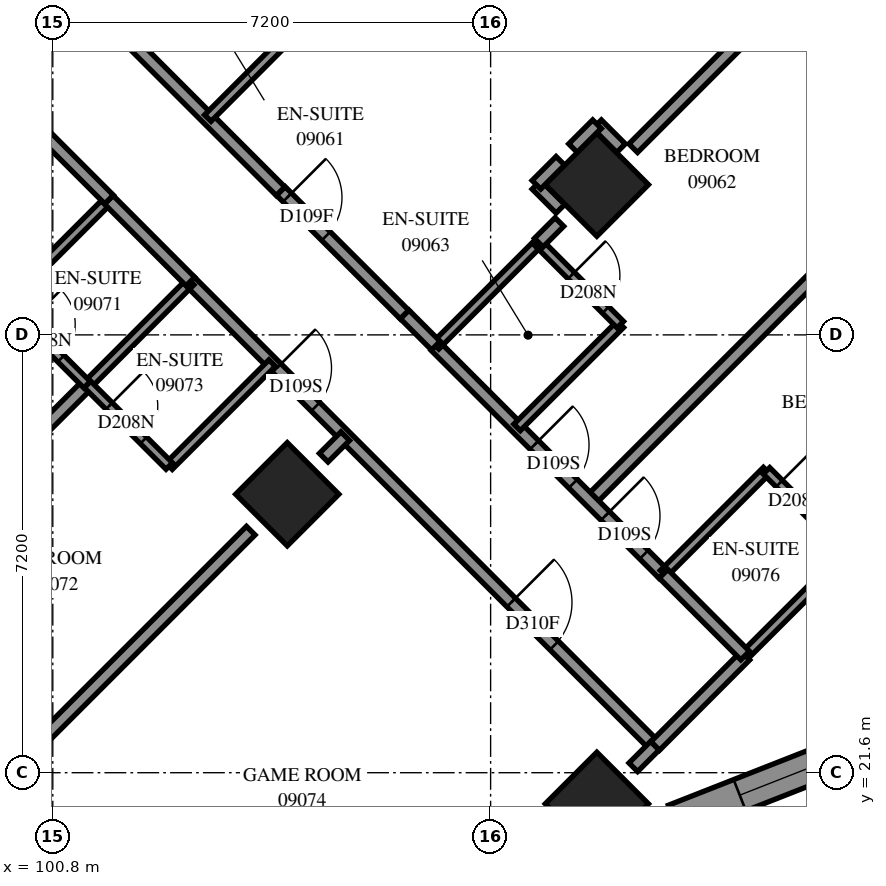
"""IFC4 building model, lengths in metres.
Left out: names, types, materials, properties, quantities, classifications, styles, units other than length and angle.
Written with IfcOpenShell. Run it as: python <this file> out.ifc"""

import sys

from ifc_helpers import new_model, si_unit, direction, frame, frame_2d, origin, origin_2d, place, context, subcontext, project, spatial, polyline, rectangle, outline, extrude, element, fill, save


model = new_model("IFC4")
c1 = context("Model", 3, precision=1e-05, world=origin(), true_north=direction((0.0, 1.0)))
c2 = subcontext(c1, "Body", "Model", "MODEL_VIEW")
j1 = project(units=[si_unit("LENGTHUNIT", "METRE"), si_unit("PLANEANGLEUNIT", "RADIAN")], contexts=[c1])
p1 = place(None, origin())
s1 = spatial("IfcSite", under=j1, at=p1, CompositionType="ELEMENT")
p2 = place(p1, origin())
s2 = spatial("IfcBuilding", under=s1, at=p2, CompositionType="ELEMENT")
p3 = place(p2, frame((0.0, 0.0, 37.2)))
s3 = spatial("IfcBuildingStorey", under=s2, at=p3, CompositionType="ELEMENT", Elevation=37.2)
for number, where, z_axis, x_axis in (
    (1, (109.747, 31.271, 0.0), (0.0, 0.0, 1.0), (0.707, -0.707, 0.0)),
    (2, (104.656, 26.18, 0.0), (0.0, 0.0, 1.0), (0.707, -0.707, 0.0)),
    (3, (109.747, 21.088, 0.0), (0.0, 0.0, 1.0), (0.707, -0.707, 0.0)),
):
    element("IfcColumn", number, at=place(p3, frame(where, z_axis=z_axis, x_axis=x_axis)), inside=s3, PredefinedType="COLUMN", context=c2, shape_type="SweptSolid", body=[
        extrude(rectangle(XDim=1.2, YDim=1.2, at=origin_2d()), origin(), (0.0, 0.0, 1.0), 3.1),
    ])
p4 = place(p3, frame((111.023, 20.809, 0.0), z_axis=(0.0, 0.0, 1.0), x_axis=(0.9307322689, 0.3657013038, 0.0)))
e4 = element("IfcWall", 4, at=p4, inside=s3, PredefinedType="SOLIDWALL", context=c2, shape_type="SweptSolid", body=[
    extrude(outline(polyline([(0.12, -0.275), (5.626, -0.275), (5.376, 0.275), (-0.12, 0.275), (0.12, -0.275)])), origin(), (0.0, 0.0, 1.0), 3.1),
])
p5 = place(p4, frame((1.154, 0.0, 0.5)))
e5 = element("IfcOpeningElement", 5, at=p5, cuts=e4, PredefinedType="OPENING", context=c2, shape_type="SweptSolid", body=[
    extrude(rectangle(XDim=2.8, YDim=2.45, at=frame_2d((1.4, 1.225))), frame((0.0, 0.285, 0.0), z_axis=(0.0, -1.0, 0.0), x_axis=(1.0, 0.0, 0.0)), (0.0, 0.0, 1.0), 0.57),
])
p6 = place(p3, frame((103.061, 29.677, 0.0), z_axis=(0.0, 0.0, 1.0), x_axis=(0.7071067812, -0.7071067812, 0.0)))
e6 = element("IfcWall", 6, at=p6, inside=s3, PredefinedType="PARTITIONING", context=c2, shape_type="SweptSolid", body=[
    extrude(rectangle(XDim=10.802, YDim=0.2, at=frame_2d((5.401, 0.0))), origin(), (0.0, 0.0, 1.0), 3.1),
])
p7 = place(p6, frame((2.012, 0.0, 0.0)))
e7 = element("IfcOpeningElement", 7, at=p7, cuts=e6, PredefinedType="OPENING", context=c2, shape_type="SweptSolid", body=[
    extrude(rectangle(XDim=0.9, YDim=2.1, at=frame_2d((0.45, 1.05))), frame((0.0, 0.11, 0.0), z_axis=(0.0, -1.0, 0.0), x_axis=(1.0, 0.0, 0.0)), (0.0, 0.0, 1.0), 0.22),
])
p8 = place(p6, frame((7.463, 0.0, 0.0)))
e8 = element("IfcOpeningElement", 8, at=p8, cuts=e6, PredefinedType="OPENING", context=c2, shape_type="SweptSolid", body=[
    extrude(rectangle(XDim=1.0, YDim=2.1, at=frame_2d((0.5, 1.05))), frame((0.0, 0.11, 0.0), z_axis=(0.0, -1.0, 0.0), x_axis=(1.0, 0.0, 0.0)), (0.0, 0.0, 1.0), 0.22),
])
p9 = place(p3, frame((99.455, 36.253, 0.0), z_axis=(0.0, 0.0, 1.0), x_axis=(0.7071067812, -0.7071067812, 0.0)))
e9 = element("IfcWall", 9, at=p9, inside=s3, PredefinedType="PARTITIONING", context=c2, shape_type="SweptSolid", body=[
    extrude(rectangle(XDim=7.201, YDim=0.2, at=frame_2d((3.601, 0.0))), origin(), (0.0, 0.0, 1.0), 3.1),
])
p10 = place(p9, frame((0.401, 0.0, 0.0)))
e10 = element("IfcOpeningElement", 10, at=p10, cuts=e9, PredefinedType="OPENING", context=c2, shape_type="SweptSolid", body=[
    extrude(rectangle(XDim=0.9, YDim=2.1, at=frame_2d((0.45, 1.05))), frame((0.0, 0.11, 0.0), z_axis=(0.0, -1.0, 0.0), x_axis=(1.0, 0.0, 0.0)), (0.0, 0.0, 1.0), 0.22),
])
p11 = place(p3, frame((96.534, 23.151, 0.0), z_axis=(0.0, 0.0, 1.0), x_axis=(0.7071067812, 0.7071067812, 0.0)))
e11 = element("IfcWall", 11, at=p11, inside=s3, PredefinedType="PARTITIONING", context=c2, shape_type="SweptSolid", body=[
    extrude(rectangle(XDim=6.835, YDim=0.2, at=frame_2d((3.417, 0.0))), origin(), (0.0, 0.0, 1.0), 3.1),
])
p12 = place(p3, frame((109.64, 26.074, 0.0), z_axis=(0.0, 0.0, 1.0), x_axis=(0.7072538194, 0.7069597124, 0.0)))
e12 = element("IfcWall", 12, at=p12, inside=s3, PredefinedType="PARTITIONING", context=c2, shape_type="SweptSolid", body=[
    extrude(rectangle(XDim=6.8, YDim=0.2, at=frame_2d((3.4, 0.0))), origin(), (0.0, 0.0, 1.0), 3.1),
])
for number, where, z_axis, x_axis in (
    (13, (110.345, 31.871, 0.0), (0.0, 0.0, 1.0), (0.707, 0.707, 0.0)),
    (14, (100.163, 21.689, 0.0), (0.0, 0.0, 1.0), (0.707, 0.707, 0.0)),
):
    element("IfcWall", number, at=place(p3, frame(where, z_axis=z_axis, x_axis=x_axis)), inside=s3, PredefinedType="PARTITIONING", context=c2, shape_type="SweptSolid", body=[
        extrude(rectangle(XDim=5.504, YDim=0.2, at=frame_2d((2.752, 0.0))), origin(), (0.0, 0.0, 1.0), 3.1),
    ])
p13 = place(p3, frame((107.093, 28.615, 0.0), z_axis=(0.0, 0.0, 1.0), x_axis=(0.7072011313, -0.7070124185, 0.0)))
e15 = element("IfcWall", 15, at=p13, inside=s3, PredefinedType="PARTITIONING", context=c2, shape_type="SweptSolid", body=[
    extrude(rectangle(XDim=5.299, YDim=0.2, at=frame_2d((2.65, 0.0))), origin(), (0.0, 0.0, 1.0), 3.1),
])
p14 = place(p13, frame((2.299, 0.0, 0.0)))
e16 = element("IfcOpeningElement", 16, at=p14, cuts=e15, PredefinedType="OPENING", context=c2, shape_type="SweptSolid", body=[
    extrude(rectangle(XDim=0.9, YDim=2.1, at=frame_2d((0.45, 1.05))), frame((0.0, 0.11, 0.0), z_axis=(0.0, -1.0, 0.0), x_axis=(1.0, 0.0, 0.0)), (0.0, 0.0, 1.0), 0.22),
])
p15 = place(p13, frame((3.949, 0.0, 0.0)))
e17 = element("IfcOpeningElement", 17, at=p15, cuts=e15, PredefinedType="OPENING", context=c2, shape_type="SweptSolid", body=[
    extrude(rectangle(XDim=0.9, YDim=2.1, at=frame_2d((0.45, 1.05))), frame((0.0, 0.11, 0.0), z_axis=(0.0, -1.0, 0.0), x_axis=(1.0, 0.0, 0.0)), (0.0, 0.0, 1.0), 0.22),
])
p16 = place(p3, frame((104.551, 31.165, 0.0), z_axis=(0.0, 0.0, 1.0), x_axis=(0.7074545101, -0.7067588812, 0.0)))
e18 = element("IfcWall", 18, at=p16, inside=s3, PredefinedType="PARTITIONING", context=c2, shape_type="SweptSolid", body=[
    extrude(rectangle(XDim=2.875, YDim=0.2, at=frame_2d((1.438, 0.0))), origin(), (0.0, 0.0, 1.0), 3.1),
])
p17 = place(p16, frame((0.148, 0.0, 0.0)))
e19 = element("IfcOpeningElement", 19, at=p17, cuts=e18, PredefinedType="OPENING", context=c2, shape_type="SweptSolid", body=[
    extrude(rectangle(XDim=0.9, YDim=2.1, at=frame_2d((0.45, 1.05))), frame((0.0, 0.11, 0.0), z_axis=(0.0, -1.0, 0.0), x_axis=(1.0, 0.0, 0.0)), (0.0, 0.0, 1.0), 0.22),
])
p18 = place(p3, frame((100.023, 29.327, 0.0), z_axis=(0.0, 0.0, 1.0), x_axis=(0.7071067812, 0.7071067812, 0.0)))
e20 = element("IfcWall", 20, at=p18, inside=s3, PredefinedType="PARTITIONING", context=c2, shape_type="SweptSolid", body=[
    extrude(rectangle(XDim=2.401, YDim=0.15, at=frame_2d((1.201, 0.0))), origin(), (0.0, 0.0, 1.0), 3.1),
])
for number, where, z_axis, x_axis in (
    (21, (101.371, 27.979, 0.0), (0.0, 0.0, 1.0), (0.707, 0.708, 0.0)),
    (22, (108.435, 27.279, 0.0), (0.0, 0.0, 1.0), (0.708, 0.707, 0.0)),
    (23, (103.349, 32.365, 0.0), (0.0, 0.0, 1.0), (0.707, 0.708, 0.0)),
):
    element("IfcWall", number, at=place(p3, frame(where, z_axis=z_axis, x_axis=x_axis)), inside=s3, PredefinedType="PARTITIONING", context=c2, shape_type="SweptSolid", body=[
        extrude(rectangle(XDim=2.4, YDim=0.15, at=frame_2d((1.2, 0.0))), origin(), (0.0, 0.0, 1.0), 3.1),
    ])
p19 = place(p3, frame((112.183, 23.531, 0.0), z_axis=(0.0, 0.0, 1.0), x_axis=(0.7075233388, 0.706689978, 0.0)))
e24 = element("IfcWall", 24, at=p19, inside=s3, PredefinedType="PARTITIONING", context=c2, shape_type="SweptSolid", body=[
    extrude(rectangle(XDim=2.4, YDim=0.15, at=frame_2d((1.2, 0.0))), origin(), (0.0, 0.0, 1.0), 2.6),
])
for number, where, z_axis, x_axis in (
    (25, (102.711, 26.641, 0.0), (0.0, 0.0, 1.0), (0.707, 0.707, 0.0)),
    (26, (107.095, 28.621, 0.0), (0.0, 0.0, 1.0), (0.707, 0.707, 0.0)),
    (27, (110.843, 24.873, 0.0), (0.0, 0.0, 1.0), (0.707, 0.707, 0.0)),
):
    element("IfcWall", number, at=place(p3, frame(where, z_axis=z_axis, x_axis=x_axis)), inside=s3, PredefinedType="PARTITIONING", context=c2, shape_type="SweptSolid", body=[
        extrude(rectangle(XDim=2.398, YDim=0.15, at=frame_2d((1.199, 0.0))), origin(), (0.0, 0.0, 1.0), 3.1),
    ])
p20 = place(p3, frame((110.705, 22.039, 0.0), z_axis=(0.0, 0.0, 1.0), x_axis=(0.7066304548, 0.7075827869, 0.0)))
e28 = element("IfcWall", 28, at=p20, inside=s3, PredefinedType="PARTITIONING", context=c2, shape_type="SweptSolid", body=[
    extrude(rectangle(XDim=2.1, YDim=0.2, at=frame_2d((1.05, 0.0))), origin(), (0.0, 0.0, 1.0), 2.6),
])
p21 = place(p3, frame((100.021, 29.323, 0.0), z_axis=(0.0, 0.0, 1.0), x_axis=(0.7071067812, -0.7071067812, 0.0)))
e29 = element("IfcWall", 29, at=p21, inside=s3, PredefinedType="PARTITIONING", context=c2, shape_type="SweptSolid", body=[
    extrude(rectangle(XDim=1.901, YDim=0.15, at=frame_2d((0.95, 0.0))), origin(), (0.0, 0.0, 1.0), 3.1),
])
p22 = place(p21, frame((0.491, 0.0, 0.0)))
e30 = element("IfcOpeningElement", 30, at=p22, cuts=e29, PredefinedType="OPENING", context=c2, shape_type="SweptSolid", body=[
    extrude(rectangle(XDim=0.8, YDim=2.1, at=frame_2d((0.4, 1.05))), frame((0.0, 0.085, 0.0), z_axis=(0.0, -1.0, 0.0), x_axis=(1.0, 0.0, 0.0)), (0.0, 0.0, 1.0), 0.17),
])
p23 = place(p3, frame((108.789, 30.313, 0.0), z_axis=(0.0, 0.0, 1.0), x_axis=(0.7071067812, -0.7071067812, 0.0)))
e31 = element("IfcWall", 31, at=p23, inside=s3, PredefinedType="PARTITIONING", context=c2, shape_type="SweptSolid", body=[
    extrude(rectangle(XDim=1.901, YDim=0.15, at=frame_2d((0.95, 0.0))), origin(), (0.0, 0.0, 1.0), 3.1),
])
p24 = place(p23, frame((0.76, 0.0, 0.0)))
e32 = element("IfcOpeningElement", 32, at=p24, cuts=e31, PredefinedType="OPENING", context=c2, shape_type="SweptSolid", body=[
    extrude(rectangle(XDim=0.8, YDim=2.1, at=frame_2d((0.4, 1.05))), frame((0.0, 0.085, 0.0), z_axis=(0.0, -1.0, 0.0), x_axis=(1.0, 0.0, 0.0)), (0.0, 0.0, 1.0), 0.17),
])
p25 = place(p3, frame((112.537, 26.565, 0.0), z_axis=(0.0, 0.0, 1.0), x_axis=(0.7071067812, -0.7071067812, 0.0)))
e33 = element("IfcWall", 33, at=p25, inside=s3, PredefinedType="PARTITIONING", context=c2, shape_type="SweptSolid", body=[
    extrude(rectangle(XDim=1.901, YDim=0.15, at=frame_2d((0.95, 0.0))), origin(), (0.0, 0.0, 1.0), 3.1),
])
p26 = place(p25, frame((0.297, 0.0, 0.0)))
e34 = element("IfcOpeningElement", 34, at=p26, cuts=e33, PredefinedType="OPENING", context=c2, shape_type="SweptSolid", body=[
    extrude(rectangle(XDim=0.8, YDim=2.1, at=frame_2d((0.4, 1.05))), frame((0.0, 0.085, 0.0), z_axis=(0.0, -1.0, 0.0), x_axis=(1.0, 0.0, 0.0)), (0.0, 0.0, 1.0), 0.17),
])
p27 = place(p3, frame((110.843, 24.871, 0.0), z_axis=(0.0, 0.0, 1.0), x_axis=(0.7065800724, -0.7076330979, 0.0)))
e35 = element("IfcWall", 35, at=p27, inside=s3, PredefinedType="PARTITIONING", context=c2, shape_type="SweptSolid", body=[
    extrude(rectangle(XDim=1.899, YDim=0.2, at=frame_2d((0.95, 0.0))), origin(), (0.0, 0.0, 1.0), 3.1),
])
p28 = place(p3, frame((101.371, 27.985, 0.0), z_axis=(0.0, 0.0, 1.0), x_axis=(0.7076330979, -0.7065800724, 0.0)))
e36 = element("IfcWall", 36, at=p28, inside=s3, PredefinedType="PARTITIONING", context=c2, shape_type="SweptSolid", body=[
    extrude(rectangle(XDim=1.899, YDim=0.15, at=frame_2d((0.95, 0.0))), origin(), (0.0, 0.0, 1.0), 3.1),
])
p29 = place(p28, frame((0.501, 0.0, 0.0)))
e37 = element("IfcOpeningElement", 37, at=p29, cuts=e36, PredefinedType="OPENING", context=c2, shape_type="SweptSolid", body=[
    extrude(rectangle(XDim=0.8, YDim=2.1, at=frame_2d((0.4, 1.05))), frame((0.0, 0.085, 0.0), z_axis=(0.0, -1.0, 0.0), x_axis=(1.0, 0.0, 0.0)), (0.0, 0.0, 1.0), 0.17),
])
p30 = place(p3, frame((101.72, 31.022, 0.0), z_axis=(0.0, 0.0, 1.0), x_axis=(0.7065800724, -0.7076330979, 0.0)))
e38 = element("IfcWall", 38, at=p30, inside=s3, PredefinedType="PARTITIONING", context=c2, shape_type="SweptSolid", body=[
    extrude(rectangle(XDim=1.899, YDim=0.2, at=frame_2d((0.95, 0.0))), origin(), (0.0, 0.0, 1.0), 3.1),
])
p31 = place(p3, frame((100.523, 32.229, 0.0), z_axis=(0.0, 0.0, 1.0), x_axis=(0.7071067812, -0.7071067812, 0.0)))
e39 = element("IfcWall", 39, at=p31, inside=s3, PredefinedType="PARTITIONING", context=c2, shape_type="SweptSolid", body=[
    extrude(rectangle(XDim=1.7, YDim=0.2, at=frame_2d((0.85, 0.0))), origin(), (0.0, 0.0, 1.0), 3.1),
])
p32 = place(p3, frame((106.587, 29.135, 0.0), z_axis=(0.0, 0.0, 1.0), x_axis=(0.7071067812, -0.7071067812, 0.0)))
e40 = element("IfcWall", 40, at=p32, inside=s3, PredefinedType="PARTITIONING", context=c2, shape_type="SweptSolid", body=[
    extrude(rectangle(XDim=0.724, YDim=0.2, at=frame_2d((0.362, 0.0))), origin(), (0.0, 0.0, 1.0), 3.1),
])
for number, where, z_axis, x_axis in (
    (41, (108.754, 31.268, 0.0), (0.0, 0.0, 1.0), (0.707, -0.707, 0.0)),
    (42, (109.751, 32.265, 0.0), (0.0, 0.0, 1.0), (0.707, -0.707, 0.0)),
    (43, (109.355, 31.871, 0.0), (0.0, 0.0, 1.0), (0.707, 0.707, 0.0)),
    (44, (108.753, 31.269, 0.0), (0.0, 0.0, 1.0), (0.707, 0.707, 0.0)),
):
    element("IfcWall", number, at=place(p3, frame(where, z_axis=z_axis, x_axis=x_axis)), inside=s3, PredefinedType="PARTITIONING", context=c2, shape_type="SweptSolid", body=[
        extrude(rectangle(XDim=0.557, YDim=0.2, at=frame_2d((0.279, 0.0))), origin(), (0.0, 0.0, 1.0), 3.1),
    ])
p33 = place(p3, frame((105.255, 26.781, 0.0), z_axis=(0.0, 0.0, 1.0), x_axis=(0.7071067812, 0.7071067812, 0.0)))
e45 = element("IfcWall", 45, at=p33, inside=s3, PredefinedType="PARTITIONING", context=c2, shape_type="SweptSolid", body=[
    extrude(rectangle(XDim=0.501, YDim=0.2, at=frame_2d((0.25, 0.0))), origin(), (0.0, 0.0, 1.0), 3.1),
])
p34 = place(p3, frame((110.347, 21.689, 0.0), z_axis=(0.0, 0.0, 1.0), x_axis=(0.7071067812, 0.7071067812, 0.0)))
e46 = element("IfcWall", 46, at=p34, inside=s3, PredefinedType="PARTITIONING", context=c2, shape_type="SweptSolid", body=[
    extrude(rectangle(XDim=0.501, YDim=0.2, at=frame_2d((0.25, 0.0))), origin(), (0.0, 0.0, 1.0), 2.6),
])
p35 = place(p3, frame((108.791, 30.317, 0.0), z_axis=(0.0, 0.0, 1.0), x_axis=(0.7071067812, 0.7071067812, 0.0)))
e47 = element("IfcWall", 47, at=p35, inside=s3, PredefinedType="PARTITIONING", context=c2, shape_type="SweptSolid", body=[
    extrude(rectangle(XDim=0.481, YDim=0.2, at=frame_2d((0.24, 0.0))), origin(), (0.0, 0.0, 1.0), 3.1),
])
p36 = place(p5, origin())
e48 = element("IfcWindow", 48, at=p36, inside=s3, PartitioningType="SINGLE_PANEL", PredefinedType="WINDOW", context=c2, shape_type="SweptSolid", body=[
    extrude(rectangle(XDim=2.8, YDim=2.45, at=frame_2d((1.4, 1.225))), frame((0.0, 0.155, 0.0), z_axis=(0.0, -1.0, 0.0), x_axis=(1.0, 0.0, 0.0)), (0.0, 0.0, 1.0), 0.06),
])
fill(e5, e48)
p37 = place(p17, origin())
e49 = element("IfcDoor", 49, at=p37, inside=s3, OperationType="SINGLE_SWING_LEFT", PredefinedType="DOOR", context=c2, shape_type="SweptSolid", body=[
    extrude(rectangle(XDim=0.9, YDim=2.1, at=frame_2d((0.45, 1.05))), frame((0.0, 0.025, 0.0), z_axis=(0.0, -1.0, 0.0), x_axis=(1.0, 0.0, 0.0)), (0.0, 0.0, 1.0), 0.05),
])
fill(e19, e49)
p38 = place(p14, origin())
e50 = element("IfcDoor", 50, at=p38, inside=s3, OperationType="SINGLE_SWING_LEFT", PredefinedType="DOOR", context=c2, shape_type="SweptSolid", body=[
    extrude(rectangle(XDim=0.9, YDim=2.1, at=frame_2d((0.45, 1.05))), frame((0.0, 0.025, 0.0), z_axis=(0.0, -1.0, 0.0), x_axis=(1.0, 0.0, 0.0)), (0.0, 0.0, 1.0), 0.05),
])
fill(e16, e50)
p39 = place(p24, origin())
e51 = element("IfcDoor", 51, at=p39, inside=s3, OperationType="SINGLE_SWING_RIGHT", PredefinedType="DOOR", context=c2, shape_type="SweptSolid", body=[
    extrude(rectangle(XDim=0.8, YDim=2.1, at=frame_2d((0.4, 1.05))), frame((0.0, 0.025, 0.0), z_axis=(0.0, -1.0, 0.0), x_axis=(1.0, 0.0, 0.0)), (0.0, 0.0, 1.0), 0.05),
])
fill(e32, e51)
p40 = place(p22, origin())
e52 = element("IfcDoor", 52, at=p40, inside=s3, OperationType="SINGLE_SWING_RIGHT", PredefinedType="DOOR", context=c2, shape_type="SweptSolid", body=[
    extrude(rectangle(XDim=0.8, YDim=2.1, at=frame_2d((0.4, 1.05))), frame((0.0, 0.025, 0.0), z_axis=(0.0, -1.0, 0.0), x_axis=(1.0, 0.0, 0.0)), (0.0, 0.0, 1.0), 0.05),
])
fill(e30, e52)
p41 = place(p7, origin())
e53 = element("IfcDoor", 53, at=p41, inside=s3, OperationType="SINGLE_SWING_LEFT", PredefinedType="DOOR", context=c2, shape_type="SweptSolid", body=[
    extrude(rectangle(XDim=0.9, YDim=2.1, at=frame_2d((0.45, 1.05))), frame((0.0, 0.025, 0.0), z_axis=(0.0, -1.0, 0.0), x_axis=(1.0, 0.0, 0.0)), (0.0, 0.0, 1.0), 0.05),
])
fill(e7, e53)
p42 = place(p29, origin())
e54 = element("IfcDoor", 54, at=p42, inside=s3, OperationType="SINGLE_SWING_RIGHT", PredefinedType="DOOR", context=c2, shape_type="SweptSolid", body=[
    extrude(rectangle(XDim=0.8, YDim=2.1, at=frame_2d((0.4, 1.05))), frame((0.0, 0.025, 0.0), z_axis=(0.0, -1.0, 0.0), x_axis=(1.0, 0.0, 0.0)), (0.0, 0.0, 1.0), 0.05),
])
fill(e37, e54)
p43 = place(p8, origin())
e55 = element("IfcDoor", 55, at=p43, inside=s3, OperationType="SINGLE_SWING_RIGHT", PredefinedType="DOOR", context=c2, shape_type="SweptSolid", body=[
    extrude(rectangle(XDim=1.0, YDim=2.1, at=frame_2d((0.5, 1.05))), frame((0.0, 0.025, 0.0), z_axis=(0.0, -1.0, 0.0), x_axis=(1.0, 0.0, 0.0)), (0.0, 0.0, 1.0), 0.05),
])
fill(e8, e55)
p44 = place(p15, origin())
e56 = element("IfcDoor", 56, at=p44, inside=s3, OperationType="SINGLE_SWING_RIGHT", PredefinedType="DOOR", context=c2, shape_type="SweptSolid", body=[
    extrude(rectangle(XDim=0.9, YDim=2.1, at=frame_2d((0.45, 1.05))), frame((0.0, 0.025, 0.0), z_axis=(0.0, -1.0, 0.0), x_axis=(1.0, 0.0, 0.0)), (0.0, 0.0, 1.0), 0.05),
])
fill(e17, e56)
p45 = place(p26, origin())
e57 = element("IfcDoor", 57, at=p45, inside=s3, OperationType="SINGLE_SWING_RIGHT", PredefinedType="DOOR", context=c2, shape_type="SweptSolid", body=[
    extrude(rectangle(XDim=0.8, YDim=2.1, at=frame_2d((0.4, 1.05))), frame((0.0, 0.025, 0.0), z_axis=(0.0, -1.0, 0.0), x_axis=(1.0, 0.0, 0.0)), (0.0, 0.0, 1.0), 0.05),
])
fill(e34, e57)
save(model, sys.argv[1])
